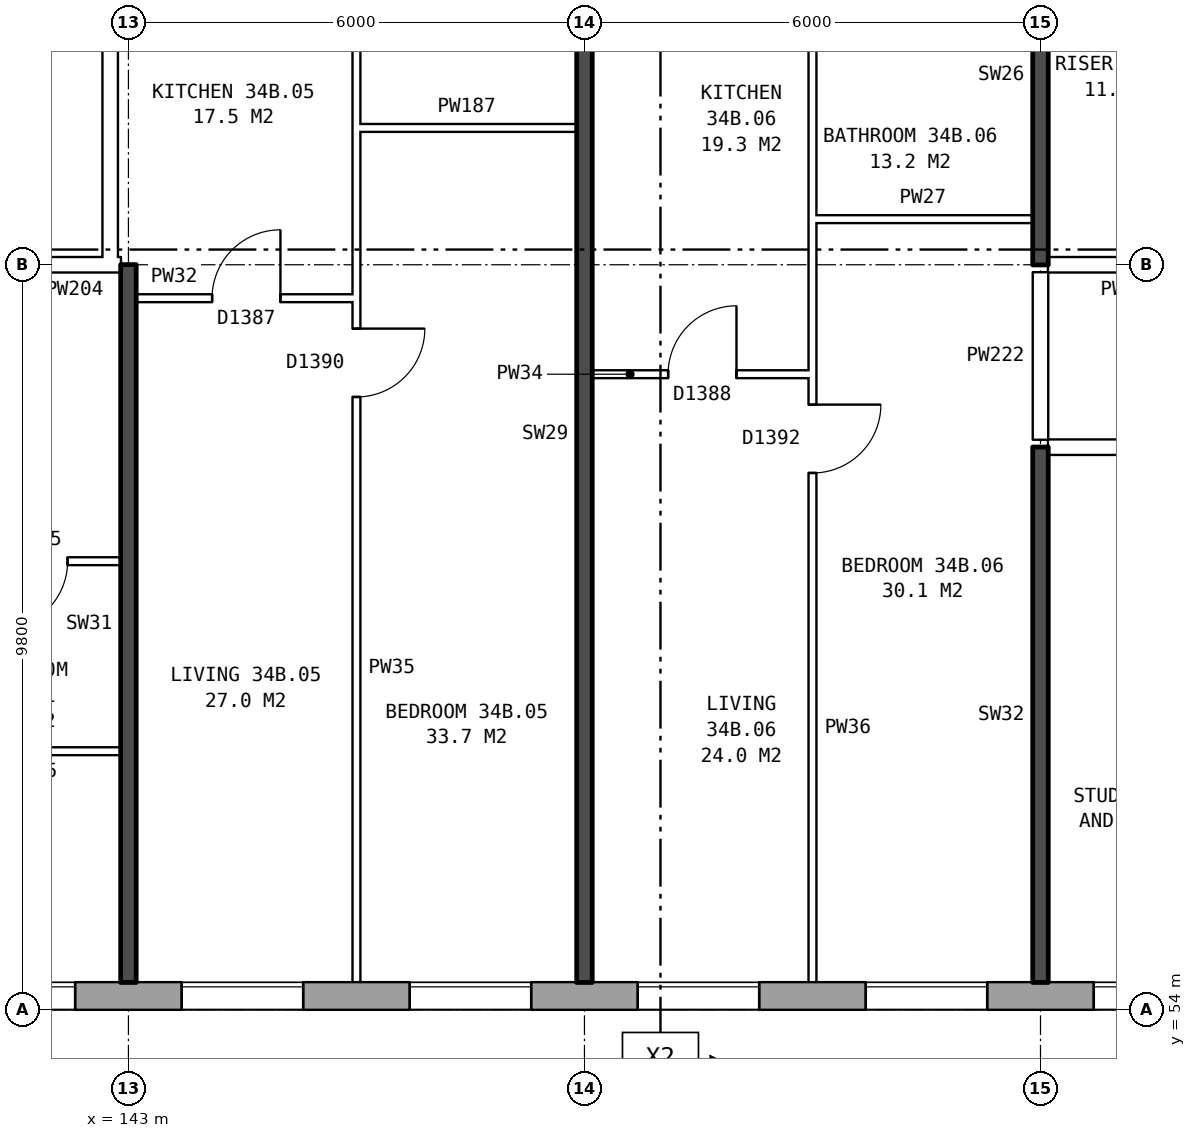
"""IFC4 building model, lengths in metres.
Left out: names, types, materials, properties, quantities, classifications, styles, units other than length and angle.
Written with IfcOpenShell. Run it as: python <this file> out.ifc"""

import sys

from ifc_helpers import new_model, si_unit, direction, frame, frame_2d, origin, place, context, subcontext, project, spatial, rectangle, extrude, element, fill, save


model = new_model("IFC4")
c1 = context("Model", 3, precision=1e-05, world=origin(), true_north=direction((0.0, 1.0)))
c2 = subcontext(c1, "Body", "Model", "MODEL_VIEW")
j1 = project(units=[si_unit("LENGTHUNIT", "METRE"), si_unit("PLANEANGLEUNIT", "RADIAN")], contexts=[c1])
p1 = place(None, origin())
s1 = spatial("IfcSite", under=j1, at=p1, CompositionType="ELEMENT")
p2 = place(p1, origin())
s2 = spatial("IfcBuilding", under=s1, at=p2, CompositionType="ELEMENT")
p3 = place(p2, frame((0.0, 0.0, 123.7)))
s3 = spatial("IfcBuildingStorey", under=s2, at=p3, CompositionType="ELEMENT", Elevation=123.7)
p4 = place(p3, frame((134.075, 54.18, 0.0), z_axis=(0.0, 0.0, 1.0), x_axis=(1.0, 0.0, 0.0)))
e1 = element("IfcWall", 1, at=p4, inside=s3, PredefinedType="STANDARD", context=c2, shape_type="SweptSolid", body=[
    extrude(rectangle(XDim=35.601, YDim=0.36, at=frame_2d((17.8, 0.0))), origin(), (0.0, 0.0, 1.0), 2.85),
])
p5 = place(p4, frame((0.3, 0.0, 0.8)))
e2 = element("IfcOpeningElement", 2, at=p5, cuts=e1, PredefinedType="OPENING", context=c2, shape_type="SweptSolid", body=[
    extrude(rectangle(XDim=0.8, YDim=1.8, at=frame_2d((0.4, 0.9))), frame((0.0, 0.19, 0.0), z_axis=(0.0, -1.0, 0.0), x_axis=(1.0, 0.0, 0.0)), (0.0, 0.0, 1.0), 0.38),
])
p6 = place(p4, frame((3.425, 0.0, 0.8)))
e3 = element("IfcOpeningElement", 3, at=p6, cuts=e1, PredefinedType="OPENING", context=c2, shape_type="SweptSolid", body=[
    extrude(rectangle(XDim=1.0, YDim=1.2, at=frame_2d((0.5, 0.6))), frame((0.0, 0.19, 0.0), z_axis=(0.0, -1.0, 0.0), x_axis=(1.0, 0.0, 0.0)), (0.0, 0.0, 1.0), 0.38),
])
p7 = place(p4, frame((6.625, 0.0, 0.8)))
e4 = element("IfcOpeningElement", 4, at=p7, cuts=e1, PredefinedType="OPENING", context=c2, shape_type="SweptSolid", body=[
    extrude(rectangle(XDim=1.6, YDim=1.8, at=frame_2d((0.8, 0.9))), frame((0.0, 0.19, 0.0), z_axis=(0.0, -1.0, 0.0), x_axis=(1.0, 0.0, 0.0)), (0.0, 0.0, 1.0), 0.38),
])
p8 = place(p4, frame((9.625, 0.0, 0.8)))
e5 = element("IfcOpeningElement", 5, at=p8, cuts=e1, PredefinedType="OPENING", context=c2, shape_type="SweptSolid", body=[
    extrude(rectangle(XDim=1.6, YDim=1.8, at=frame_2d((0.8, 0.9))), frame((0.0, 0.19, 0.0), z_axis=(0.0, -1.0, 0.0), x_axis=(1.0, 0.0, 0.0)), (0.0, 0.0, 1.0), 0.38),
])
p9 = place(p4, frame((12.625, 0.0, 0.8)))
e6 = element("IfcOpeningElement", 6, at=p9, cuts=e1, PredefinedType="OPENING", context=c2, shape_type="SweptSolid", body=[
    extrude(rectangle(XDim=1.6, YDim=1.8, at=frame_2d((0.8, 0.9))), frame((0.0, 0.19, 0.0), z_axis=(0.0, -1.0, 0.0), x_axis=(1.0, 0.0, 0.0)), (0.0, 0.0, 1.0), 0.38),
])
p10 = place(p4, frame((15.625, 0.0, 0.8)))
e7 = element("IfcOpeningElement", 7, at=p10, cuts=e1, PredefinedType="OPENING", context=c2, shape_type="SweptSolid", body=[
    extrude(rectangle(XDim=1.6, YDim=1.8, at=frame_2d((0.8, 0.9))), frame((0.0, 0.19, 0.0), z_axis=(0.0, -1.0, 0.0), x_axis=(1.0, 0.0, 0.0)), (0.0, 0.0, 1.0), 0.38),
])
p11 = place(p4, frame((18.625, 0.0, 0.8)))
e8 = element("IfcOpeningElement", 8, at=p11, cuts=e1, PredefinedType="OPENING", context=c2, shape_type="SweptSolid", body=[
    extrude(rectangle(XDim=1.6, YDim=1.8, at=frame_2d((0.8, 0.9))), frame((0.0, 0.19, 0.0), z_axis=(0.0, -1.0, 0.0), x_axis=(1.0, 0.0, 0.0)), (0.0, 0.0, 1.0), 0.38),
])
p12 = place(p4, frame((21.625, 0.0, 0.8)))
e9 = element("IfcOpeningElement", 9, at=p12, cuts=e1, PredefinedType="OPENING", context=c2, shape_type="SweptSolid", body=[
    extrude(rectangle(XDim=1.6, YDim=1.8, at=frame_2d((0.8, 0.9))), frame((0.0, 0.19, 0.0), z_axis=(0.0, -1.0, 0.0), x_axis=(1.0, 0.0, 0.0)), (0.0, 0.0, 1.0), 0.38),
])
p13 = place(p4, frame((24.625, 0.0, 0.8)))
e10 = element("IfcOpeningElement", 10, at=p13, cuts=e1, PredefinedType="OPENING", context=c2, shape_type="SweptSolid", body=[
    extrude(rectangle(XDim=1.6, YDim=1.8, at=frame_2d((0.8, 0.9))), frame((0.0, 0.19, 0.0), z_axis=(0.0, -1.0, 0.0), x_axis=(1.0, 0.0, 0.0)), (0.0, 0.0, 1.0), 0.38),
])
p14 = place(p4, frame((27.625, 0.0, 0.8)))
e11 = element("IfcOpeningElement", 11, at=p14, cuts=e1, PredefinedType="OPENING", context=c2, shape_type="SweptSolid", body=[
    extrude(rectangle(XDim=1.6, YDim=1.8, at=frame_2d((0.8, 0.9))), frame((0.0, 0.19, 0.0), z_axis=(0.0, -1.0, 0.0), x_axis=(1.0, 0.0, 0.0)), (0.0, 0.0, 1.0), 0.38),
])
p15 = place(p4, frame((29.525, 0.0, 0.8)))
e12 = element("IfcOpeningElement", 12, at=p15, cuts=e1, PredefinedType="OPENING", context=c2, shape_type="SweptSolid", body=[
    extrude(rectangle(XDim=1.6, YDim=1.8, at=frame_2d((0.8, 0.9))), frame((0.0, 0.19, 0.0), z_axis=(0.0, -1.0, 0.0), x_axis=(1.0, 0.0, 0.0)), (0.0, 0.0, 1.0), 0.38),
])
p16 = place(p4, frame((33.525, 0.0, 1.7)))
e13 = element("IfcOpeningElement", 13, at=p16, cuts=e1, PredefinedType="OPENING", context=c2, shape_type="SweptSolid", body=[
    extrude(rectangle(XDim=0.6, YDim=0.9, at=frame_2d((0.3, 0.45))), frame((0.0, 0.19, 0.0), z_axis=(0.0, -1.0, 0.0), x_axis=(1.0, 0.0, 0.0)), (0.0, 0.0, 1.0), 0.38),
])
p17 = place(p4, frame((1.4, 0.0, 1.6)))
e14 = element("IfcOpeningElement", 14, at=p17, cuts=e1, PredefinedType="OPENING", context=c2, shape_type="SweptSolid", body=[
    extrude(rectangle(XDim=0.6, YDim=0.9, at=frame_2d((0.3, 0.45))), frame((0.0, 0.19, 0.0), z_axis=(0.0, -1.0, 0.0), x_axis=(1.0, 0.0, 0.0)), (0.0, 0.0, 1.0), 0.38),
])
p18 = place(p4, frame((4.725, 0.0, 0.8)))
e15 = element("IfcOpeningElement", 15, at=p18, cuts=e1, PredefinedType="OPENING", context=c2, shape_type="SweptSolid", body=[
    extrude(rectangle(XDim=1.4, YDim=1.8, at=frame_2d((0.7, 0.9))), frame((0.0, 0.19, 0.0), z_axis=(0.0, -1.0, 0.0), x_axis=(1.0, 0.0, 0.0)), (0.0, 0.0, 1.0), 0.38),
])
p19 = place(p4, frame((31.425, 0.0, 0.8)))
e16 = element("IfcOpeningElement", 16, at=p19, cuts=e1, PredefinedType="OPENING", context=c2, shape_type="SweptSolid", body=[
    extrude(rectangle(XDim=0.6, YDim=1.2, at=frame_2d((0.3, 0.6))), frame((0.0, 0.19, 0.0), z_axis=(0.0, -1.0, 0.0), x_axis=(1.0, 0.0, 0.0)), (0.0, 0.0, 1.0), 0.38),
])
p20 = place(p4, frame((34.425, 0.0, 0.8)))
e17 = element("IfcOpeningElement", 17, at=p20, cuts=e1, PredefinedType="OPENING", context=c2, shape_type="SweptSolid", body=[
    extrude(rectangle(XDim=0.8, YDim=1.8, at=frame_2d((0.4, 0.9))), frame((0.0, 0.19, 0.0), z_axis=(0.0, -1.0, 0.0), x_axis=(1.0, 0.0, 0.0)), (0.0, 0.0, 1.0), 0.38),
])
p21 = place(p3, frame((142.76, 63.9, 0.0), z_axis=(0.0, 0.0, 1.0), x_axis=(0.0, 1.0, 0.0)))
e18 = element("IfcWall", 18, at=p21, inside=s3, PredefinedType="PARTITIONING", context=c2, shape_type="SweptSolid", body=[
    extrude(rectangle(XDim=12.2, YDim=0.2, at=frame_2d((6.1, 0.0))), origin(), (0.0, 0.0, 1.0), 2.85),
])
p22 = place(p21, frame((5.1, 0.0, 0.0)))
e19 = element("IfcOpeningElement", 19, at=p22, cuts=e18, PredefinedType="OPENING", context=c2, shape_type="SweptSolid", body=[
    extrude(rectangle(XDim=2.0, YDim=2.1, at=frame_2d((1.0, 1.05))), frame((0.0, 0.11, 0.0), z_axis=(0.0, -1.0, 0.0), x_axis=(1.0, 0.0, 0.0)), (0.0, 0.0, 1.0), 0.22),
])
p23 = place(p3, frame((140.6, 57.4, 0.0), z_axis=(0.0, 0.0, 1.0), x_axis=(1.0, 0.0, 0.0)))
e20 = element("IfcWall", 20, at=p23, inside=s3, PredefinedType="PARTITIONING", context=c2, shape_type="SweptSolid", body=[
    extrude(rectangle(XDim=2.3, YDim=0.1, at=frame_2d((1.15, 0.0))), origin(), (0.0, 0.0, 1.0), 2.85),
])
p24 = place(p3, frame((137.1, 59.9, 0.0), z_axis=(0.0, 0.0, 1.0), x_axis=(1.0, 0.0, 0.0)))
e21 = element("IfcWall", 21, at=p24, inside=s3, PredefinedType="PARTITIONING", context=c2, shape_type="SweptSolid", body=[
    extrude(rectangle(XDim=5.8, YDim=0.1, at=frame_2d((2.9, 0.0))), origin(), (0.0, 0.0, 1.0), 2.85),
])
p25 = place(p24, frame((1.3, 0.0, 0.0)))
e22 = element("IfcOpeningElement", 22, at=p25, cuts=e21, PredefinedType="OPENING", context=c2, shape_type="SweptSolid", body=[
    extrude(rectangle(XDim=0.9, YDim=2.1, at=frame_2d((0.45, 1.05))), frame((0.0, 0.06, 0.0), z_axis=(0.0, -1.0, 0.0), x_axis=(1.0, 0.0, 0.0)), (0.0, 0.0, 1.0), 0.12),
])
p26 = place(p24, frame((4.2, 0.0, 0.0)))
e23 = element("IfcOpeningElement", 23, at=p26, cuts=e21, PredefinedType="OPENING", context=c2, shape_type="SweptSolid", body=[
    extrude(rectangle(XDim=0.9, YDim=2.1, at=frame_2d((0.45, 1.05))), frame((0.0, 0.06, 0.0), z_axis=(0.0, -1.0, 0.0), x_axis=(1.0, 0.0, 0.0)), (0.0, 0.0, 1.0), 0.12),
])
p27 = place(p3, frame((155.1, 61.4, 0.0), z_axis=(0.0, 0.0, 1.0), x_axis=(1.0, 0.0, 0.0)))
e24 = element("IfcWall", 24, at=p27, inside=s3, PredefinedType="PARTITIONING", context=c2, shape_type="SweptSolid", body=[
    extrude(rectangle(XDim=17.29, YDim=0.2, at=frame_2d((8.645, 0.0))), origin(), (0.0, 0.0, 1.0), 2.85),
])
p28 = place(p27, frame((1.45, 0.0, 0.0)))
e25 = element("IfcOpeningElement", 25, at=p28, cuts=e24, PredefinedType="OPENING", context=c2, shape_type="SweptSolid", body=[
    extrude(rectangle(XDim=1.0, YDim=2.1, at=frame_2d((0.5, 1.05))), frame((0.0, 0.11, 0.0), z_axis=(0.0, -1.0, 0.0), x_axis=(1.0, 0.0, 0.0)), (0.0, 0.0, 1.0), 0.22),
])
p29 = place(p27, frame((8.4, 0.0, 0.0)))
e26 = element("IfcOpeningElement", 26, at=p29, cuts=e24, PredefinedType="OPENING", context=c2, shape_type="SweptSolid", body=[
    extrude(rectangle(XDim=1.0, YDim=2.1, at=frame_2d((0.5, 1.05))), frame((0.0, 0.11, 0.0), z_axis=(0.0, -1.0, 0.0), x_axis=(1.0, 0.0, 0.0)), (0.0, 0.0, 1.0), 0.22),
])
p30 = place(p3, frame((149.1, 62.36, 0.0), z_axis=(0.0, 0.0, 1.0), x_axis=(1.0, 0.0, 0.0)))
e27 = element("IfcWall", 27, at=p30, inside=s3, PredefinedType="PARTITIONING", context=c2, shape_type="SweptSolid", body=[
    extrude(rectangle(XDim=2.9, YDim=0.1, at=frame_2d((1.45, 0.0))), origin(), (0.0, 0.0, 1.0), 2.85),
])
p31 = place(p30, frame((1.0, 0.0, 0.0)))
e28 = element("IfcOpeningElement", 28, at=p31, cuts=e27, PredefinedType="OPENING", context=c2, shape_type="SweptSolid", body=[
    extrude(rectangle(XDim=0.9, YDim=2.1, at=frame_2d((0.45, 1.05))), frame((0.0, 0.06, 0.0), z_axis=(0.0, -1.0, 0.0), x_axis=(1.0, 0.0, 0.0)), (0.0, 0.0, 1.0), 0.12),
])
p32 = place(p3, frame((143.1, 63.36, 0.0), z_axis=(0.0, 0.0, 1.0), x_axis=(1.0, 0.0, 0.0)))
e29 = element("IfcWall", 29, at=p32, inside=s3, PredefinedType="PARTITIONING", context=c2, shape_type="SweptSolid", body=[
    extrude(rectangle(XDim=2.9, YDim=0.1, at=frame_2d((1.45, 0.0))), origin(), (0.0, 0.0, 1.0), 2.85),
])
p33 = place(p32, frame((1.0, 0.0, 0.0)))
e30 = element("IfcOpeningElement", 30, at=p33, cuts=e29, PredefinedType="OPENING", context=c2, shape_type="SweptSolid", body=[
    extrude(rectangle(XDim=0.9, YDim=2.1, at=frame_2d((0.45, 1.05))), frame((0.0, 0.06, 0.0), z_axis=(0.0, -1.0, 0.0), x_axis=(1.0, 0.0, 0.0)), (0.0, 0.0, 1.0), 0.12),
])
p34 = place(p3, frame((139.76, 63.8, 0.0), z_axis=(0.0, 0.0, 1.0), x_axis=(1.0, 0.0, 0.0)))
e31 = element("IfcWall", 31, at=p34, inside=s3, PredefinedType="PARTITIONING", context=c2, shape_type="SweptSolid", body=[
    extrude(rectangle(XDim=3.0, YDim=0.2, at=frame_2d((1.5, 0.0))), origin(), (0.0, 0.0, 1.0), 2.85),
])
p35 = place(p34, frame((1.0, 0.0, 0.0)))
e32 = element("IfcOpeningElement", 32, at=p35, cuts=e31, PredefinedType="OPENING", context=c2, shape_type="SweptSolid", body=[
    extrude(rectangle(XDim=1.0, YDim=2.1, at=frame_2d((0.5, 1.05))), frame((0.0, 0.11, 0.0), z_axis=(0.0, -1.0, 0.0), x_axis=(1.0, 0.0, 0.0)), (0.0, 0.0, 1.0), 0.22),
])
p36 = place(p3, frame((142.76, 63.8, 0.0), z_axis=(0.0, 0.0, 1.0), x_axis=(1.0, 0.0, 0.0)))
e33 = element("IfcWall", 33, at=p36, inside=s3, PredefinedType="PARTITIONING", context=c2, shape_type="SweptSolid", body=[
    extrude(rectangle(XDim=0.14, YDim=0.2, at=frame_2d((0.07, 0.0))), origin(), (0.0, 0.0, 1.0), 2.85),
])
p37 = place(p3, frame((155.1, 63.8, 0.0), z_axis=(0.0, 0.0, 1.0), x_axis=(1.0, 0.0, 0.0)))
e34 = element("IfcWall", 34, at=p37, inside=s3, PredefinedType="PARTITIONING", context=c2, shape_type="SweptSolid", body=[
    extrude(rectangle(XDim=2.14, YDim=0.2, at=frame_2d((1.07, 0.0))), origin(), (0.0, 0.0, 1.0), 2.85),
])
for number, where, z_axis, x_axis in (
    (35, (152.0, 64.4, 0.0), (0.0, 0.0, 1.0), (1.0, 0.0, 0.0)),
    (36, (146.0, 65.6, 0.0), (0.0, 0.0, 1.0), (1.0, 0.0, 0.0)),
):
    element("IfcWall", number, at=place(p3, frame(where, z_axis=z_axis, x_axis=x_axis)), inside=s3, PredefinedType="PARTITIONING", context=c2, shape_type="SweptSolid", body=[
        extrude(rectangle(XDim=2.9, YDim=0.1, at=frame_2d((1.45, 0.0))), origin(), (0.0, 0.0, 1.0), 2.85),
    ])
p38 = place(p3, frame((143.0, 54.36, 0.0), z_axis=(0.0, 0.0, 1.0), x_axis=(0.0, 1.0, 0.0)))
e37 = element("IfcWall", 37, at=p38, inside=s3, PredefinedType="SOLIDWALL", context=c2, shape_type="SweptSolid", body=[
    extrude(rectangle(XDim=9.44, YDim=0.2, at=frame_2d((4.72, 0.0))), origin(), (0.0, 0.0, 1.0), 2.85),
])
p39 = place(p3, frame((146.0, 54.36, 0.0), z_axis=(0.0, 0.0, 1.0), x_axis=(0.0, 1.0, 0.0)))
e38 = element("IfcWall", 38, at=p39, inside=s3, PredefinedType="PARTITIONING", context=c2, shape_type="SweptSolid", body=[
    extrude(rectangle(XDim=14.34, YDim=0.1, at=frame_2d((7.17, 0.0))), origin(), (0.0, 0.0, 1.0), 2.85),
])
p40 = place(p39, frame((7.7, 0.0, 0.0)))
e39 = element("IfcOpeningElement", 39, at=p40, cuts=e38, PredefinedType="OPENING", context=c2, shape_type="SweptSolid", body=[
    extrude(rectangle(XDim=0.9, YDim=2.1, at=frame_2d((0.45, 1.05))), frame((0.0, 0.06, 0.0), z_axis=(0.0, -1.0, 0.0), x_axis=(1.0, 0.0, 0.0)), (0.0, 0.0, 1.0), 0.12),
])
p41 = place(p39, frame((13.04, 0.0, 0.0)))
e40 = element("IfcOpeningElement", 40, at=p41, cuts=e38, PredefinedType="OPENING", context=c2, shape_type="SweptSolid", body=[
    extrude(rectangle(XDim=0.9, YDim=2.1, at=frame_2d((0.45, 1.05))), frame((0.0, 0.06, 0.0), z_axis=(0.0, -1.0, 0.0), x_axis=(1.0, 0.0, 0.0)), (0.0, 0.0, 1.0), 0.12),
])
p42 = place(p3, frame((149.0, 54.36, 0.0), z_axis=(0.0, 0.0, 1.0), x_axis=(0.0, 1.0, 0.0)))
e41 = element("IfcWall", 41, at=p42, inside=s3, PredefinedType="SOLIDWALL", context=c2, shape_type="SweptSolid", body=[
    extrude(rectangle(XDim=14.44, YDim=0.2, at=frame_2d((7.22, 0.0))), origin(), (0.0, 0.0, 1.0), 2.85),
])
p43 = place(p3, frame((152.0, 54.36, 0.0), z_axis=(0.0, 0.0, 1.0), x_axis=(0.0, 1.0, 0.0)))
e42 = element("IfcWall", 42, at=p43, inside=s3, PredefinedType="PARTITIONING", context=c2, shape_type="SweptSolid", body=[
    extrude(rectangle(XDim=14.34, YDim=0.1, at=frame_2d((7.17, 0.0))), origin(), (0.0, 0.0, 1.0), 2.85),
])
p44 = place(p43, frame((6.7, 0.0, 0.0)))
e43 = element("IfcOpeningElement", 43, at=p44, cuts=e42, PredefinedType="OPENING", context=c2, shape_type="SweptSolid", body=[
    extrude(rectangle(XDim=0.9, YDim=2.1, at=frame_2d((0.45, 1.05))), frame((0.0, 0.06, 0.0), z_axis=(0.0, -1.0, 0.0), x_axis=(1.0, 0.0, 0.0)), (0.0, 0.0, 1.0), 0.12),
])
p45 = place(p43, frame((13.04, 0.0, 0.0)))
e44 = element("IfcOpeningElement", 44, at=p45, cuts=e42, PredefinedType="OPENING", context=c2, shape_type="SweptSolid", body=[
    extrude(rectangle(XDim=0.9, YDim=2.1, at=frame_2d((0.45, 1.05))), frame((0.0, 0.06, 0.0), z_axis=(0.0, -1.0, 0.0), x_axis=(1.0, 0.0, 0.0)), (0.0, 0.0, 1.0), 0.12),
])
p46 = place(p3, frame((155.0, 54.36, 0.0), z_axis=(0.0, 0.0, 1.0), x_axis=(0.0, 1.0, 0.0)))
e45 = element("IfcWall", 45, at=p46, inside=s3, PredefinedType="SOLIDWALL", context=c2, shape_type="SweptSolid", body=[
    extrude(rectangle(XDim=7.04, YDim=0.2, at=frame_2d((3.52, 0.0))), origin(), (0.0, 0.0, 1.0), 2.85),
])
p47 = place(p3, frame((155.0, 61.5, 0.0), z_axis=(0.0, 0.0, 1.0), x_axis=(0.0, 1.0, 0.0)))
e46 = element("IfcWall", 46, at=p47, inside=s3, PredefinedType="PARTITIONING", context=c2, shape_type="SweptSolid", body=[
    extrude(rectangle(XDim=2.2, YDim=0.2, at=frame_2d((1.1, 0.0))), origin(), (0.0, 0.0, 1.0), 2.85),
])
p48 = place(p3, frame((155.0, 63.8, 0.0), z_axis=(0.0, 0.0, 1.0), x_axis=(0.0, 1.0, 0.0)))
e47 = element("IfcWall", 47, at=p48, inside=s3, PredefinedType="SOLIDWALL", context=c2, shape_type="SweptSolid", body=[
    extrude(rectangle(XDim=5.0, YDim=0.2, at=frame_2d((2.5, 0.0))), origin(), (0.0, 0.0, 1.0), 2.85),
])
p49 = place(p7, origin())
e48 = element("IfcWindow", 48, at=p49, inside=s3, PartitioningType="SINGLE_PANEL", PredefinedType="WINDOW", context=c2, shape_type="SweptSolid", body=[
    extrude(rectangle(XDim=1.6, YDim=1.8, at=frame_2d((0.8, 0.9))), frame((0.0, 0.15, 0.0), z_axis=(0.0, -1.0, 0.0), x_axis=(1.0, 0.0, 0.0)), (0.0, 0.0, 1.0), 0.06),
])
fill(e4, e48)
p50 = place(p8, origin())
e49 = element("IfcWindow", 49, at=p50, inside=s3, PartitioningType="SINGLE_PANEL", PredefinedType="WINDOW", context=c2, shape_type="SweptSolid", body=[
    extrude(rectangle(XDim=1.6, YDim=1.8, at=frame_2d((0.8, 0.9))), frame((0.0, 0.15, 0.0), z_axis=(0.0, -1.0, 0.0), x_axis=(1.0, 0.0, 0.0)), (0.0, 0.0, 1.0), 0.06),
])
fill(e5, e49)
p51 = place(p9, origin())
e50 = element("IfcWindow", 50, at=p51, inside=s3, PartitioningType="SINGLE_PANEL", PredefinedType="WINDOW", context=c2, shape_type="SweptSolid", body=[
    extrude(rectangle(XDim=1.6, YDim=1.8, at=frame_2d((0.8, 0.9))), frame((0.0, 0.15, 0.0), z_axis=(0.0, -1.0, 0.0), x_axis=(1.0, 0.0, 0.0)), (0.0, 0.0, 1.0), 0.06),
])
fill(e6, e50)
p52 = place(p10, origin())
e51 = element("IfcWindow", 51, at=p52, inside=s3, PartitioningType="SINGLE_PANEL", PredefinedType="WINDOW", context=c2, shape_type="SweptSolid", body=[
    extrude(rectangle(XDim=1.6, YDim=1.8, at=frame_2d((0.8, 0.9))), frame((0.0, 0.15, 0.0), z_axis=(0.0, -1.0, 0.0), x_axis=(1.0, 0.0, 0.0)), (0.0, 0.0, 1.0), 0.06),
])
fill(e7, e51)
p53 = place(p11, origin())
e52 = element("IfcWindow", 52, at=p53, inside=s3, PartitioningType="SINGLE_PANEL", PredefinedType="WINDOW", context=c2, shape_type="SweptSolid", body=[
    extrude(rectangle(XDim=1.6, YDim=1.8, at=frame_2d((0.8, 0.9))), frame((0.0, 0.15, 0.0), z_axis=(0.0, -1.0, 0.0), x_axis=(1.0, 0.0, 0.0)), (0.0, 0.0, 1.0), 0.06),
])
fill(e8, e52)
p54 = place(p12, origin())
e53 = element("IfcWindow", 53, at=p54, inside=s3, PartitioningType="SINGLE_PANEL", PredefinedType="WINDOW", context=c2, shape_type="SweptSolid", body=[
    extrude(rectangle(XDim=1.6, YDim=1.8, at=frame_2d((0.8, 0.9))), frame((0.0, 0.15, 0.0), z_axis=(0.0, -1.0, 0.0), x_axis=(1.0, 0.0, 0.0)), (0.0, 0.0, 1.0), 0.06),
])
fill(e9, e53)
p55 = place(p26, frame((0.9, 0.0, 0.0), z_axis=(0.0, 0.0, 1.0), x_axis=(-1.0, 0.0, 0.0)))
e54 = element("IfcDoor", 54, at=p55, inside=s3, OperationType="SINGLE_SWING_RIGHT", PredefinedType="DOOR", context=c2, shape_type="SweptSolid", body=[
    extrude(rectangle(XDim=0.9, YDim=2.1, at=frame_2d((0.45, 1.05))), frame((0.0, 0.025, 0.0), z_axis=(0.0, -1.0, 0.0), x_axis=(1.0, 0.0, 0.0)), (0.0, 0.0, 1.0), 0.05),
])
fill(e23, e54)
p56 = place(p40, frame((0.9, 0.0, 0.0), z_axis=(0.0, 0.0, 1.0), x_axis=(-1.0, 0.0, 0.0)))
e55 = element("IfcDoor", 55, at=p56, inside=s3, OperationType="SINGLE_SWING_LEFT", PredefinedType="DOOR", context=c2, shape_type="SweptSolid", body=[
    extrude(rectangle(XDim=0.9, YDim=2.1, at=frame_2d((0.45, 1.05))), frame((0.0, 0.025, 0.0), z_axis=(0.0, -1.0, 0.0), x_axis=(1.0, 0.0, 0.0)), (0.0, 0.0, 1.0), 0.05),
])
fill(e39, e55)
p57 = place(p33, origin())
e56 = element("IfcDoor", 56, at=p57, inside=s3, OperationType="SINGLE_SWING_RIGHT", PredefinedType="DOOR", context=c2, shape_type="SweptSolid", body=[
    extrude(rectangle(XDim=0.9, YDim=2.1, at=frame_2d((0.45, 1.05))), frame((0.0, 0.025, 0.0), z_axis=(0.0, -1.0, 0.0), x_axis=(1.0, 0.0, 0.0)), (0.0, 0.0, 1.0), 0.05),
])
fill(e30, e56)
p58 = place(p44, frame((0.9, 0.0, 0.0), z_axis=(0.0, 0.0, 1.0), x_axis=(-1.0, 0.0, 0.0)))
e57 = element("IfcDoor", 57, at=p58, inside=s3, OperationType="SINGLE_SWING_LEFT", PredefinedType="DOOR", context=c2, shape_type="SweptSolid", body=[
    extrude(rectangle(XDim=0.9, YDim=2.1, at=frame_2d((0.45, 1.05))), frame((0.0, 0.025, 0.0), z_axis=(0.0, -1.0, 0.0), x_axis=(1.0, 0.0, 0.0)), (0.0, 0.0, 1.0), 0.05),
])
fill(e43, e57)
p59 = place(p31, origin())
e58 = element("IfcDoor", 58, at=p59, inside=s3, OperationType="SINGLE_SWING_RIGHT", PredefinedType="DOOR", context=c2, shape_type="SweptSolid", body=[
    extrude(rectangle(XDim=0.9, YDim=2.1, at=frame_2d((0.45, 1.05))), frame((0.0, 0.025, 0.0), z_axis=(0.0, -1.0, 0.0), x_axis=(1.0, 0.0, 0.0)), (0.0, 0.0, 1.0), 0.05),
])
fill(e28, e58)
save(model, sys.argv[1])
